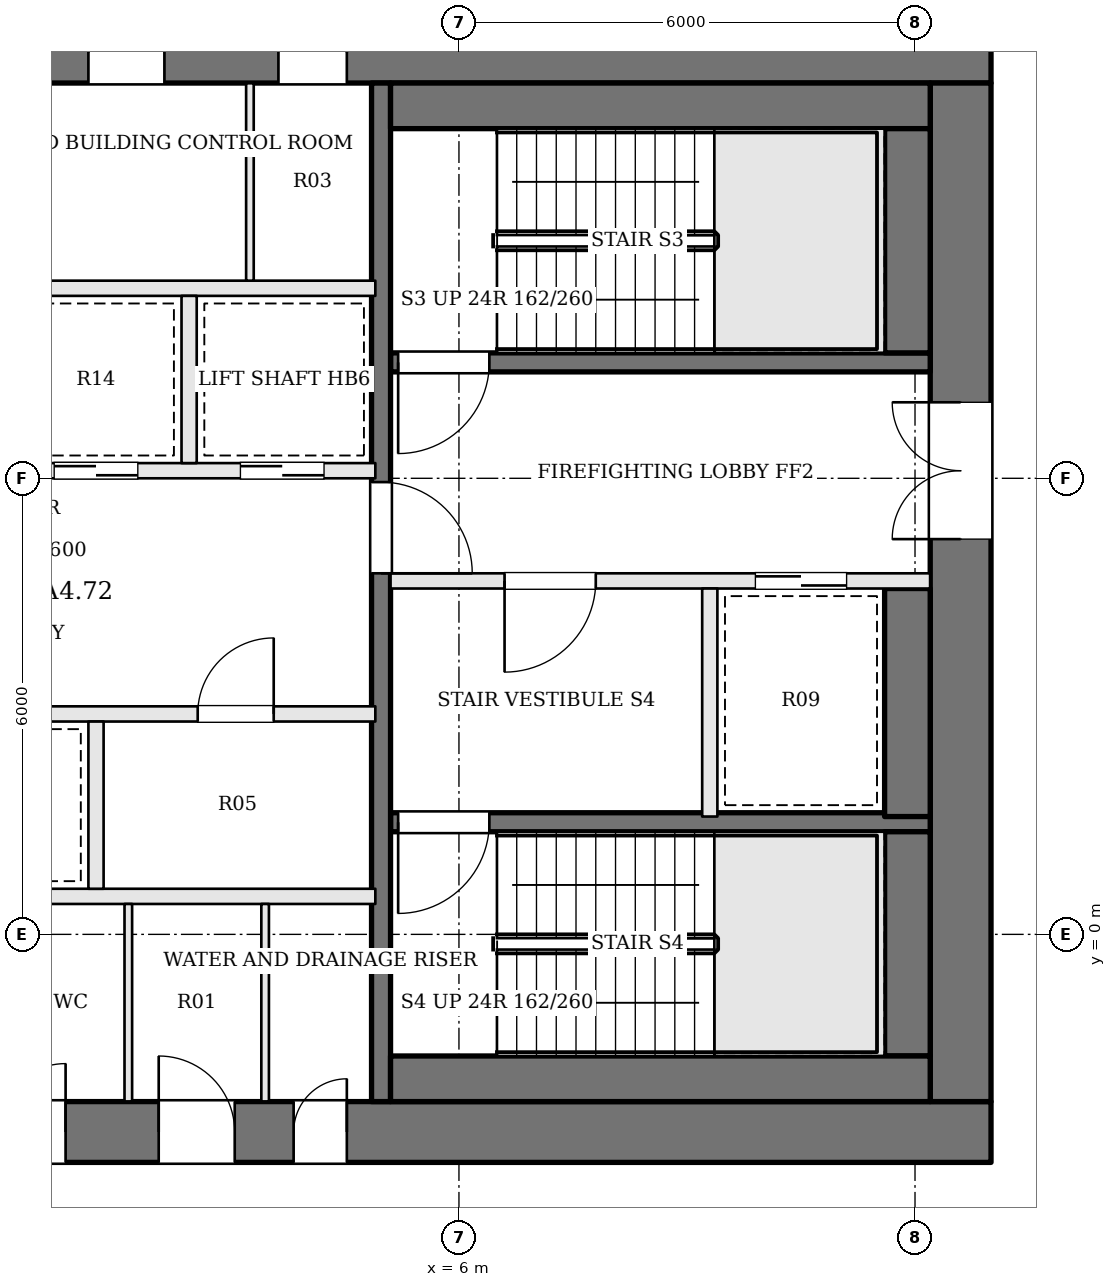
"""IFC4 building model, lengths in metres.
Left out: names, types, materials, properties, quantities, classifications, styles, units other than length and angle.
Written with IfcOpenShell. Run it as: python <this file> out.ifc"""

import sys

from ifc_helpers import new_model, si_unit, direction, frame, frame_2d, origin, place, context, subcontext, project, spatial, rectangle, extrude, element, fill, save


model = new_model("IFC4")
c1 = context("Model", 3, precision=1e-05, world=origin(), true_north=direction((0.0, 1.0)))
c2 = subcontext(c1, "Body", "Model", "MODEL_VIEW")
j1 = project(units=[si_unit("LENGTHUNIT", "METRE"), si_unit("PLANEANGLEUNIT", "RADIAN")], contexts=[c1])
p1 = place(None, origin())
s1 = spatial("IfcSite", under=j1, at=p1, CompositionType="ELEMENT")
p2 = place(p1, origin())
s2 = spatial("IfcBuilding", under=s1, at=p2, CompositionType="ELEMENT")
p3 = place(p2, frame((0.0, 0.0, 276.6)))
s3 = spatial("IfcBuildingStorey", under=s2, at=p3, CompositionType="ELEMENT", Elevation=276.6)
p4 = place(p3, frame((-13.0, 11.6, 0.0), z_axis=(0.0, 0.0, 1.0), x_axis=(1.0, 0.0, 0.0)))
e1 = element("IfcWall", 1, at=p4, inside=s3, PredefinedType="SHEAR", context=c2, shape_type="SweptSolid", body=[
    extrude(rectangle(XDim=26.0, YDim=0.8, at=frame_2d((13.0, 0.0))), origin(), (0.0, 0.0, 1.0), 3.9),
])
p5 = place(p4, frame((9.225, 0.0, 0.0)))
e2 = element("IfcOpeningElement", 2, at=p5, cuts=e1, PredefinedType="OPENING", context=c2, shape_type="SweptSolid", body=[
    extrude(rectangle(XDim=1.0, YDim=2.1, at=frame_2d((0.5, 1.05))), frame((0.0, 0.41, 0.0), z_axis=(0.0, -1.0, 0.0), x_axis=(1.0, 0.0, 0.0)), (0.0, 0.0, 1.0), 0.82),
])
p6 = place(p4, frame((11.825, 0.0, 0.0)))
e3 = element("IfcOpeningElement", 3, at=p6, cuts=e1, PredefinedType="OPENING", context=c2, shape_type="SweptSolid", body=[
    extrude(rectangle(XDim=0.7, YDim=2.1, at=frame_2d((0.35, 1.05))), frame((0.0, 0.41, 0.0), z_axis=(0.0, -1.0, 0.0), x_axis=(1.0, 0.0, 0.0)), (0.0, 0.0, 1.0), 0.82),
])
p7 = place(p4, frame((14.125, 0.0, 0.0)))
e4 = element("IfcOpeningElement", 4, at=p7, cuts=e1, PredefinedType="OPENING", context=c2, shape_type="SweptSolid", body=[
    extrude(rectangle(XDim=1.0, YDim=2.1, at=frame_2d((0.5, 1.05))), frame((0.0, 0.41, 0.0), z_axis=(0.0, -1.0, 0.0), x_axis=(1.0, 0.0, 0.0)), (0.0, 0.0, 1.0), 0.82),
])
p8 = place(p4, frame((16.625, 0.0, 0.0)))
e5 = element("IfcOpeningElement", 5, at=p8, cuts=e1, PredefinedType="OPENING", context=c2, shape_type="SweptSolid", body=[
    extrude(rectangle(XDim=0.9, YDim=2.1, at=frame_2d((0.45, 1.05))), frame((0.0, 0.41, 0.0), z_axis=(0.0, -1.0, 0.0), x_axis=(1.0, 0.0, 0.0)), (0.0, 0.0, 1.0), 0.82),
])
p9 = place(p3, frame((-13.0, -2.6, 0.0), z_axis=(0.0, 0.0, 1.0), x_axis=(1.0, 0.0, 0.0)))
e6 = element("IfcWall", 6, at=p9, inside=s3, PredefinedType="SHEAR", context=c2, shape_type="SweptSolid", body=[
    extrude(rectangle(XDim=26.0, YDim=0.8, at=frame_2d((13.0, 0.0))), origin(), (0.0, 0.0, 1.0), 3.9),
])
p10 = place(p9, frame((9.65, 0.0, 0.0)))
e7 = element("IfcOpeningElement", 7, at=p10, cuts=e6, PredefinedType="OPENING", context=c2, shape_type="SweptSolid", body=[
    extrude(rectangle(XDim=0.9, YDim=2.1, at=frame_2d((0.45, 1.05))), frame((0.0, 0.41, 0.0), z_axis=(0.0, -1.0, 0.0), x_axis=(1.0, 0.0, 0.0)), (0.0, 0.0, 1.0), 0.82),
])
p11 = place(p9, frame((12.925, 0.0, 0.0)))
e8 = element("IfcOpeningElement", 8, at=p11, cuts=e6, PredefinedType="OPENING", context=c2, shape_type="SweptSolid", body=[
    extrude(rectangle(XDim=0.9, YDim=2.1, at=frame_2d((0.45, 1.05))), frame((0.0, 0.41, 0.0), z_axis=(0.0, -1.0, 0.0), x_axis=(1.0, 0.0, 0.0)), (0.0, 0.0, 1.0), 0.82),
])
p12 = place(p9, frame((15.05, 0.0, 0.0)))
e9 = element("IfcOpeningElement", 9, at=p12, cuts=e6, PredefinedType="OPENING", context=c2, shape_type="SweptSolid", body=[
    extrude(rectangle(XDim=1.0, YDim=2.1, at=frame_2d((0.5, 1.05))), frame((0.0, 0.41, 0.0), z_axis=(0.0, -1.0, 0.0), x_axis=(1.0, 0.0, 0.0)), (0.0, 0.0, 1.0), 0.82),
])
p13 = place(p9, frame((16.825, 0.0, 0.0)))
e10 = element("IfcOpeningElement", 10, at=p13, cuts=e6, PredefinedType="OPENING", context=c2, shape_type="SweptSolid", body=[
    extrude(rectangle(XDim=0.7, YDim=2.1, at=frame_2d((0.35, 1.05))), frame((0.0, 0.41, 0.0), z_axis=(0.0, -1.0, 0.0), x_axis=(1.0, 0.0, 0.0)), (0.0, 0.0, 1.0), 0.82),
])
p14 = place(p3, frame((12.6, -2.2, 0.0), z_axis=(0.0, 0.0, 1.0), x_axis=(0.0, 1.0, 0.0)))
e11 = element("IfcWall", 11, at=p14, inside=s3, PredefinedType="SHEAR", context=c2, shape_type="SweptSolid", body=[
    extrude(rectangle(XDim=13.4, YDim=0.8, at=frame_2d((6.7, 0.0))), origin(), (0.0, 0.0, 1.0), 3.9),
])
p15 = place(p14, frame((7.4, 0.0, 0.0)))
e12 = element("IfcOpeningElement", 12, at=p15, cuts=e11, PredefinedType="OPENING", context=c2, shape_type="SweptSolid", body=[
    extrude(rectangle(XDim=1.8, YDim=2.1, at=frame_2d((0.9, 1.05))), frame((0.0, 0.41, 0.0), z_axis=(0.0, -1.0, 0.0), x_axis=(1.0, 0.0, 0.0)), (0.0, 0.0, 1.0), 0.82),
])
p16 = place(p3, frame((12.2, 7.525, 0.0), z_axis=(0.0, 0.0, 1.0), x_axis=(-1.0, 0.0, 0.0)))
e13 = element("IfcWall", 13, at=p16, inside=s3, PredefinedType="SOLIDWALL", context=c2, shape_type="SweptSolid", body=[
    extrude(rectangle(XDim=7.1, YDim=0.25, at=frame_2d((3.55, 0.0))), origin(), (0.0, 0.0, 1.0), 3.7),
])
p17 = place(p16, frame((5.8, 0.0, 0.0)))
e14 = element("IfcOpeningElement", 14, at=p17, cuts=e13, PredefinedType="OPENING", context=c2, shape_type="SweptSolid", body=[
    extrude(rectangle(XDim=1.2, YDim=2.1, at=frame_2d((0.6, 1.05))), frame((0.0, 0.135, 0.0), z_axis=(0.0, -1.0, 0.0), x_axis=(1.0, 0.0, 0.0)), (0.0, 0.0, 1.0), 0.27),
])
p18 = place(p3, frame((12.2, 4.65, 0.0), z_axis=(0.0, 0.0, 1.0), x_axis=(-1.0, 0.0, 0.0)))
e15 = element("IfcWall", 15, at=p18, inside=s3, PredefinedType="SOLIDWALL", context=c2, shape_type="SweptSolid", body=[
    extrude(rectangle(XDim=7.1, YDim=0.2, at=frame_2d((3.55, 0.0))), origin(), (0.0, 0.0, 1.0), 3.7),
])
p19 = place(p18, frame((4.4, 0.0, 0.0)))
e16 = element("IfcOpeningElement", 16, at=p19, cuts=e15, PredefinedType="OPENING", context=c2, shape_type="SweptSolid", body=[
    extrude(rectangle(XDim=1.2, YDim=2.1, at=frame_2d((0.6, 1.05))), frame((0.0, 0.11, 0.0), z_axis=(0.0, -1.0, 0.0), x_axis=(1.0, 0.0, 0.0)), (0.0, 0.0, 1.0), 0.22),
])
p20 = place(p18, frame((1.1, 0.0, 0.0)))
e17 = element("IfcOpeningElement", 17, at=p20, cuts=e15, PredefinedType="OPENING", context=c2, shape_type="SweptSolid", body=[
    extrude(rectangle(XDim=1.2, YDim=2.1, at=frame_2d((0.6, 1.05))), frame((0.0, 0.11, 0.0), z_axis=(0.0, -1.0, 0.0), x_axis=(1.0, 0.0, 0.0)), (0.0, 0.0, 1.0), 0.22),
])
p21 = place(p3, frame((12.2, 1.475, 0.0), z_axis=(0.0, 0.0, 1.0), x_axis=(-1.0, 0.0, 0.0)))
e18 = element("IfcWall", 18, at=p21, inside=s3, PredefinedType="SOLIDWALL", context=c2, shape_type="SweptSolid", body=[
    extrude(rectangle(XDim=7.1, YDim=0.25, at=frame_2d((3.55, 0.0))), origin(), (0.0, 0.0, 1.0), 3.7),
])
p22 = place(p21, frame((5.8, 0.0, 0.0)))
e19 = element("IfcOpeningElement", 19, at=p22, cuts=e18, PredefinedType="OPENING", context=c2, shape_type="SweptSolid", body=[
    extrude(rectangle(XDim=1.2, YDim=2.1, at=frame_2d((0.6, 1.05))), frame((0.0, 0.135, 0.0), z_axis=(0.0, -1.0, 0.0), x_axis=(1.0, 0.0, 0.0)), (0.0, 0.0, 1.0), 0.27),
])
p23 = place(p3, frame((9.3, 4.55, 0.0), z_axis=(0.0, 0.0, 1.0), x_axis=(0.0, -1.0, 0.0)))
e20 = element("IfcWall", 20, at=p23, inside=s3, PredefinedType="SOLIDWALL", context=c2, shape_type="SweptSolid", body=[
    extrude(rectangle(XDim=3.0, YDim=0.2, at=frame_2d((1.5, 0.0))), origin(), (0.0, 0.0, 1.0), 3.7),
])
p24 = place(p3, frame((4.975, 11.2, 0.0), z_axis=(0.0, 0.0, 1.0), x_axis=(0.0, -1.0, 0.0)))
e21 = element("IfcWall", 21, at=p24, inside=s3, PredefinedType="SOLIDWALL", context=c2, shape_type="SweptSolid", body=[
    extrude(rectangle(XDim=13.4, YDim=0.25, at=frame_2d((6.7, 0.0))), origin(), (0.0, 0.0, 1.0), 3.7),
])
p25 = place(p24, frame((5.25, 0.0, 0.0)))
e22 = element("IfcOpeningElement", 22, at=p25, cuts=e21, PredefinedType="OPENING", context=c2, shape_type="SweptSolid", body=[
    extrude(rectangle(XDim=1.2, YDim=2.1, at=frame_2d((0.6, 1.05))), frame((0.0, 0.135, 0.0), z_axis=(0.0, -1.0, 0.0), x_axis=(1.0, 0.0, 0.0)), (0.0, 0.0, 1.0), 0.27),
])
p26 = place(p3, frame((12.2, 10.9, 0.0), z_axis=(0.0, 0.0, 1.0), x_axis=(-1.0, 0.0, 0.0)))
e23 = element("IfcWall", 23, at=p26, inside=s3, PredefinedType="SOLIDWALL", context=c2, shape_type="SweptSolid", body=[
    extrude(rectangle(XDim=7.1, YDim=0.6, at=frame_2d((3.55, 0.0))), origin(), (0.0, 0.0, 1.0), 3.7),
])
p27 = place(p3, frame((11.9, 10.6, 0.0), z_axis=(0.0, 0.0, 1.0), x_axis=(0.0, -1.0, 0.0)))
e24 = element("IfcWall", 24, at=p27, inside=s3, PredefinedType="SOLIDWALL", context=c2, shape_type="SweptSolid", body=[
    extrude(rectangle(XDim=2.95, YDim=0.6, at=frame_2d((1.475, 0.0))), origin(), (0.0, 0.0, 1.0), 3.7),
])
p28 = place(p3, frame((11.9, 4.55, 0.0), z_axis=(0.0, 0.0, 1.0), x_axis=(0.0, -1.0, 0.0)))
e25 = element("IfcWall", 25, at=p28, inside=s3, PredefinedType="SOLIDWALL", context=c2, shape_type="SweptSolid", body=[
    extrude(rectangle(XDim=3.0, YDim=0.6, at=frame_2d((1.5, 0.0))), origin(), (0.0, 0.0, 1.0), 3.7),
])
p29 = place(p3, frame((11.9, 1.35, 0.0), z_axis=(0.0, 0.0, 1.0), x_axis=(0.0, -1.0, 0.0)))
e26 = element("IfcWall", 26, at=p29, inside=s3, PredefinedType="SOLIDWALL", context=c2, shape_type="SweptSolid", body=[
    extrude(rectangle(XDim=2.95, YDim=0.6, at=frame_2d((1.475, 0.0))), origin(), (0.0, 0.0, 1.0), 3.7),
])
p30 = place(p3, frame((12.2, -1.9, 0.0), z_axis=(0.0, 0.0, 1.0), x_axis=(-1.0, 0.0, 0.0)))
e27 = element("IfcWall", 27, at=p30, inside=s3, PredefinedType="SOLIDWALL", context=c2, shape_type="SweptSolid", body=[
    extrude(rectangle(XDim=7.1, YDim=0.6, at=frame_2d((3.55, 0.0))), origin(), (0.0, 0.0, 1.0), 3.7),
])
p31 = place(p3, frame((-4.9, 0.5, 0.0), z_axis=(0.0, 0.0, 1.0), x_axis=(1.0, 0.0, 0.0)))
e28 = element("IfcWall", 28, at=p31, inside=s3, PredefinedType="SOLIDWALL", context=c2, shape_type="SweptSolid", body=[
    extrude(rectangle(XDim=9.8, YDim=0.2, at=frame_2d((4.9, 0.0))), origin(), (0.0, 0.0, 1.0), 3.7),
])
p32 = place(p3, frame((-4.9, 2.9, 0.0), z_axis=(0.0, 0.0, 1.0), x_axis=(1.0, 0.0, 0.0)))
e29 = element("IfcWall", 29, at=p32, inside=s3, PredefinedType="SOLIDWALL", context=c2, shape_type="SweptSolid", body=[
    extrude(rectangle(XDim=9.8, YDim=0.2, at=frame_2d((4.9, 0.0))), origin(), (0.0, 0.0, 1.0), 3.7),
])
p33 = place(p32, frame((0.675, 0.0, 0.0)))
e30 = element("IfcOpeningElement", 30, at=p33, cuts=e29, PredefinedType="OPENING", context=c2, shape_type="SweptSolid", body=[
    extrude(rectangle(XDim=1.1, YDim=2.1, at=frame_2d((0.55, 1.05))), frame((0.0, 0.11, 0.0), z_axis=(0.0, -1.0, 0.0), x_axis=(1.0, 0.0, 0.0)), (0.0, 0.0, 1.0), 0.22),
])
p34 = place(p32, frame((2.613, 0.0, 0.0)))
e31 = element("IfcOpeningElement", 31, at=p34, cuts=e29, PredefinedType="OPENING", context=c2, shape_type="SweptSolid", body=[
    extrude(rectangle(XDim=0.9, YDim=2.1, at=frame_2d((0.45, 1.05))), frame((0.0, 0.11, 0.0), z_axis=(0.0, -1.0, 0.0), x_axis=(1.0, 0.0, 0.0)), (0.0, 0.0, 1.0), 0.22),
])
p35 = place(p32, frame((4.35, 0.0, 0.0)))
e32 = element("IfcOpeningElement", 32, at=p35, cuts=e29, PredefinedType="OPENING", context=c2, shape_type="SweptSolid", body=[
    extrude(rectangle(XDim=1.1, YDim=2.1, at=frame_2d((0.55, 1.05))), frame((0.0, 0.11, 0.0), z_axis=(0.0, -1.0, 0.0), x_axis=(1.0, 0.0, 0.0)), (0.0, 0.0, 1.0), 0.22),
])
p36 = place(p32, frame((7.463, 0.0, 0.0)))
e33 = element("IfcOpeningElement", 33, at=p36, cuts=e29, PredefinedType="OPENING", context=c2, shape_type="SweptSolid", body=[
    extrude(rectangle(XDim=1.0, YDim=2.1, at=frame_2d((0.5, 1.05))), frame((0.0, 0.11, 0.0), z_axis=(0.0, -1.0, 0.0), x_axis=(1.0, 0.0, 0.0)), (0.0, 0.0, 1.0), 0.22),
])
p37 = place(p3, frame((-4.9, 6.1, 0.0), z_axis=(0.0, 0.0, 1.0), x_axis=(1.0, 0.0, 0.0)))
e34 = element("IfcWall", 34, at=p37, inside=s3, PredefinedType="SOLIDWALL", context=c2, shape_type="SweptSolid", body=[
    extrude(rectangle(XDim=9.8, YDim=0.2, at=frame_2d((4.9, 0.0))), origin(), (0.0, 0.0, 1.0), 3.7),
])
p38 = place(p37, frame((0.675, 0.0, 0.0)))
e35 = element("IfcOpeningElement", 35, at=p38, cuts=e34, PredefinedType="OPENING", context=c2, shape_type="SweptSolid", body=[
    extrude(rectangle(XDim=1.1, YDim=2.1, at=frame_2d((0.55, 1.05))), frame((0.0, 0.11, 0.0), z_axis=(0.0, -1.0, 0.0), x_axis=(1.0, 0.0, 0.0)), (0.0, 0.0, 1.0), 0.22),
])
p39 = place(p37, frame((3.125, 0.0, 0.0)))
e36 = element("IfcOpeningElement", 36, at=p39, cuts=e34, PredefinedType="OPENING", context=c2, shape_type="SweptSolid", body=[
    extrude(rectangle(XDim=1.1, YDim=2.1, at=frame_2d((0.55, 1.05))), frame((0.0, 0.11, 0.0), z_axis=(0.0, -1.0, 0.0), x_axis=(1.0, 0.0, 0.0)), (0.0, 0.0, 1.0), 0.22),
])
p40 = place(p37, frame((5.575, 0.0, 0.0)))
e37 = element("IfcOpeningElement", 37, at=p40, cuts=e34, PredefinedType="OPENING", context=c2, shape_type="SweptSolid", body=[
    extrude(rectangle(XDim=1.1, YDim=2.1, at=frame_2d((0.55, 1.05))), frame((0.0, 0.11, 0.0), z_axis=(0.0, -1.0, 0.0), x_axis=(1.0, 0.0, 0.0)), (0.0, 0.0, 1.0), 0.22),
])
p41 = place(p37, frame((8.025, 0.0, 0.0)))
e38 = element("IfcOpeningElement", 38, at=p41, cuts=e34, PredefinedType="OPENING", context=c2, shape_type="SweptSolid", body=[
    extrude(rectangle(XDim=1.1, YDim=2.1, at=frame_2d((0.55, 1.05))), frame((0.0, 0.11, 0.0), z_axis=(0.0, -1.0, 0.0), x_axis=(1.0, 0.0, 0.0)), (0.0, 0.0, 1.0), 0.22),
])
p42 = place(p3, frame((-4.9, 8.5, 0.0), z_axis=(0.0, 0.0, 1.0), x_axis=(1.0, 0.0, 0.0)))
e39 = element("IfcWall", 39, at=p42, inside=s3, PredefinedType="SOLIDWALL", context=c2, shape_type="SweptSolid", body=[
    extrude(rectangle(XDim=9.8, YDim=0.2, at=frame_2d((4.9, 0.0))), origin(), (0.0, 0.0, 1.0), 3.7),
])
for number, where, z_axis, x_axis in (
    (40, (1.225, 0.6, 0.0), (0.0, 0.0, 1.0), (0.0, 1.0, 0.0)),
    (41, (2.45, 6.2, 0.0), (0.0, 0.0, 1.0), (0.0, 1.0, 0.0)),
):
    element("IfcWall", number, at=place(p3, frame(where, z_axis=z_axis, x_axis=x_axis)), inside=s3, PredefinedType="SOLIDWALL", context=c2, shape_type="SweptSolid", body=[
        extrude(rectangle(XDim=2.2, YDim=0.2, at=frame_2d((1.1, 0.0))), origin(), (0.0, 0.0, 1.0), 3.7),
    ])
for number, where, z_axis, x_axis in (
    (42, (1.65, -2.2, 0.0), (0.0, 0.0, 1.0), (0.0, 1.0, 0.0)),
    (43, (3.45, -2.2, 0.0), (0.0, 0.0, 1.0), (0.0, 1.0, 0.0)),
    (44, (3.25, 8.6, 0.0), (0.0, 0.0, 1.0), (0.0, 1.0, 0.0)),
):
    element("IfcWall", number, at=place(p3, frame(where, z_axis=z_axis, x_axis=x_axis)), inside=s3, PredefinedType="PARTITIONING", context=c2, shape_type="SweptSolid", body=[
        extrude(rectangle(XDim=2.6, YDim=0.1, at=frame_2d((1.3, 0.0))), origin(), (0.0, 0.0, 1.0), 3.7),
    ])
p43 = place(p15, origin())
e45 = element("IfcDoor", 45, at=p43, inside=s3, OperationType="DOUBLE_DOOR_SINGLE_SWING", PredefinedType="DOOR", context=c2, shape_type="SweptSolid", body=[
    extrude(rectangle(XDim=1.8, YDim=2.1, at=frame_2d((0.9, 1.05))), frame((0.0, 0.025, 0.0), z_axis=(0.0, -1.0, 0.0), x_axis=(1.0, 0.0, 0.0)), (0.0, 0.0, 1.0), 0.05),
])
fill(e12, e45)
p44 = place(p25, origin())
e46 = element("IfcDoor", 46, at=p44, inside=s3, OperationType="SINGLE_SWING_RIGHT", PredefinedType="DOOR", context=c2, shape_type="SweptSolid", body=[
    extrude(rectangle(XDim=1.2, YDim=2.1, at=frame_2d((0.6, 1.05))), frame((0.0, 0.025, 0.0), z_axis=(0.0, -1.0, 0.0), x_axis=(1.0, 0.0, 0.0)), (0.0, 0.0, 1.0), 0.05),
])
fill(e22, e46)
p45 = place(p19, origin())
e47 = element("IfcDoor", 47, at=p45, inside=s3, OperationType="SINGLE_SWING_RIGHT", PredefinedType="DOOR", context=c2, shape_type="SweptSolid", body=[
    extrude(rectangle(XDim=1.2, YDim=2.1, at=frame_2d((0.6, 1.05))), frame((0.0, 0.025, 0.0), z_axis=(0.0, -1.0, 0.0), x_axis=(1.0, 0.0, 0.0)), (0.0, 0.0, 1.0), 0.05),
])
fill(e16, e47)
p46 = place(p17, origin())
e48 = element("IfcDoor", 48, at=p46, inside=s3, OperationType="SINGLE_SWING_RIGHT", PredefinedType="DOOR", context=c2, shape_type="SweptSolid", body=[
    extrude(rectangle(XDim=1.2, YDim=2.1, at=frame_2d((0.6, 1.05))), frame((0.0, 0.025, 0.0), z_axis=(0.0, -1.0, 0.0), x_axis=(1.0, 0.0, 0.0)), (0.0, 0.0, 1.0), 0.05),
])
fill(e14, e48)
p47 = place(p22, origin())
e49 = element("IfcDoor", 49, at=p47, inside=s3, OperationType="SINGLE_SWING_RIGHT", PredefinedType="DOOR", context=c2, shape_type="SweptSolid", body=[
    extrude(rectangle(XDim=1.2, YDim=2.1, at=frame_2d((0.6, 1.05))), frame((0.0, 0.025, 0.0), z_axis=(0.0, -1.0, 0.0), x_axis=(1.0, 0.0, 0.0)), (0.0, 0.0, 1.0), 0.05),
])
fill(e19, e49)
p48 = place(p20, origin())
e50 = element("IfcDoor", 50, at=p48, inside=s3, OperationType="SLIDING_TO_RIGHT", PredefinedType="DOOR", context=c2, shape_type="SweptSolid", body=[
    extrude(rectangle(XDim=1.2, YDim=2.1, at=frame_2d((0.6, 1.05))), frame((0.0, 0.025, 0.0), z_axis=(0.0, -1.0, 0.0), x_axis=(1.0, 0.0, 0.0)), (0.0, 0.0, 1.0), 0.05),
])
fill(e17, e50)
p49 = place(p36, origin())
e51 = element("IfcDoor", 51, at=p49, inside=s3, OperationType="SINGLE_SWING_RIGHT", PredefinedType="DOOR", context=c2, shape_type="SweptSolid", body=[
    extrude(rectangle(XDim=1.0, YDim=2.1, at=frame_2d((0.5, 1.05))), frame((0.0, 0.025, 0.0), z_axis=(0.0, -1.0, 0.0), x_axis=(1.0, 0.0, 0.0)), (0.0, 0.0, 1.0), 0.05),
])
fill(e33, e51)
p50 = place(p40, origin())
e52 = element("IfcDoor", 52, at=p50, inside=s3, OperationType="SLIDING_TO_RIGHT", PredefinedType="DOOR", context=c2, shape_type="SweptSolid", body=[
    extrude(rectangle(XDim=1.1, YDim=2.1, at=frame_2d((0.55, 1.05))), frame((0.0, 0.025, 0.0), z_axis=(0.0, -1.0, 0.0), x_axis=(1.0, 0.0, 0.0)), (0.0, 0.0, 1.0), 0.05),
])
fill(e37, e52)
p51 = place(p41, origin())
e53 = element("IfcDoor", 53, at=p51, inside=s3, OperationType="SLIDING_TO_LEFT", PredefinedType="DOOR", context=c2, shape_type="SweptSolid", body=[
    extrude(rectangle(XDim=1.1, YDim=2.1, at=frame_2d((0.55, 1.05))), frame((0.0, 0.025, 0.0), z_axis=(0.0, -1.0, 0.0), x_axis=(1.0, 0.0, 0.0)), (0.0, 0.0, 1.0), 0.05),
])
fill(e38, e53)
p52 = place(p11, origin())
e54 = element("IfcDoor", 54, at=p52, inside=s3, OperationType="SINGLE_SWING_RIGHT", PredefinedType="DOOR", context=c2, shape_type="SweptSolid", body=[
    extrude(rectangle(XDim=0.9, YDim=2.1, at=frame_2d((0.45, 1.05))), frame((0.0, 0.025, 0.0), z_axis=(0.0, -1.0, 0.0), x_axis=(1.0, 0.0, 0.0)), (0.0, 0.0, 1.0), 0.05),
])
fill(e8, e54)
p53 = place(p12, origin())
e55 = element("IfcDoor", 55, at=p53, inside=s3, OperationType="SINGLE_SWING_LEFT", PredefinedType="DOOR", context=c2, shape_type="SweptSolid", body=[
    extrude(rectangle(XDim=1.0, YDim=2.1, at=frame_2d((0.5, 1.05))), frame((0.0, 0.025, 0.0), z_axis=(0.0, -1.0, 0.0), x_axis=(1.0, 0.0, 0.0)), (0.0, 0.0, 1.0), 0.05),
])
fill(e9, e55)
p54 = place(p13, origin())
e56 = element("IfcDoor", 56, at=p54, inside=s3, OperationType="SINGLE_SWING_RIGHT", PredefinedType="DOOR", context=c2, shape_type="SweptSolid", body=[
    extrude(rectangle(XDim=0.7, YDim=2.1, at=frame_2d((0.35, 1.05))), frame((0.0, 0.025, 0.0), z_axis=(0.0, -1.0, 0.0), x_axis=(1.0, 0.0, 0.0)), (0.0, 0.0, 1.0), 0.05),
])
fill(e10, e56)
p55 = place(p7, origin())
e57 = element("IfcDoor", 57, at=p55, inside=s3, OperationType="SINGLE_SWING_LEFT", PredefinedType="DOOR", context=c2, shape_type="SweptSolid", body=[
    extrude(rectangle(XDim=1.0, YDim=2.1, at=frame_2d((0.5, 1.05))), frame((0.0, 0.025, 0.0), z_axis=(0.0, -1.0, 0.0), x_axis=(1.0, 0.0, 0.0)), (0.0, 0.0, 1.0), 0.05),
])
fill(e4, e57)
p56 = place(p8, origin())
e58 = element("IfcDoor", 58, at=p56, inside=s3, OperationType="SINGLE_SWING_RIGHT", PredefinedType="DOOR", context=c2, shape_type="SweptSolid", body=[
    extrude(rectangle(XDim=0.9, YDim=2.1, at=frame_2d((0.45, 1.05))), frame((0.0, 0.025, 0.0), z_axis=(0.0, -1.0, 0.0), x_axis=(1.0, 0.0, 0.0)), (0.0, 0.0, 1.0), 0.05),
])
fill(e5, e58)
save(model, sys.argv[1])
